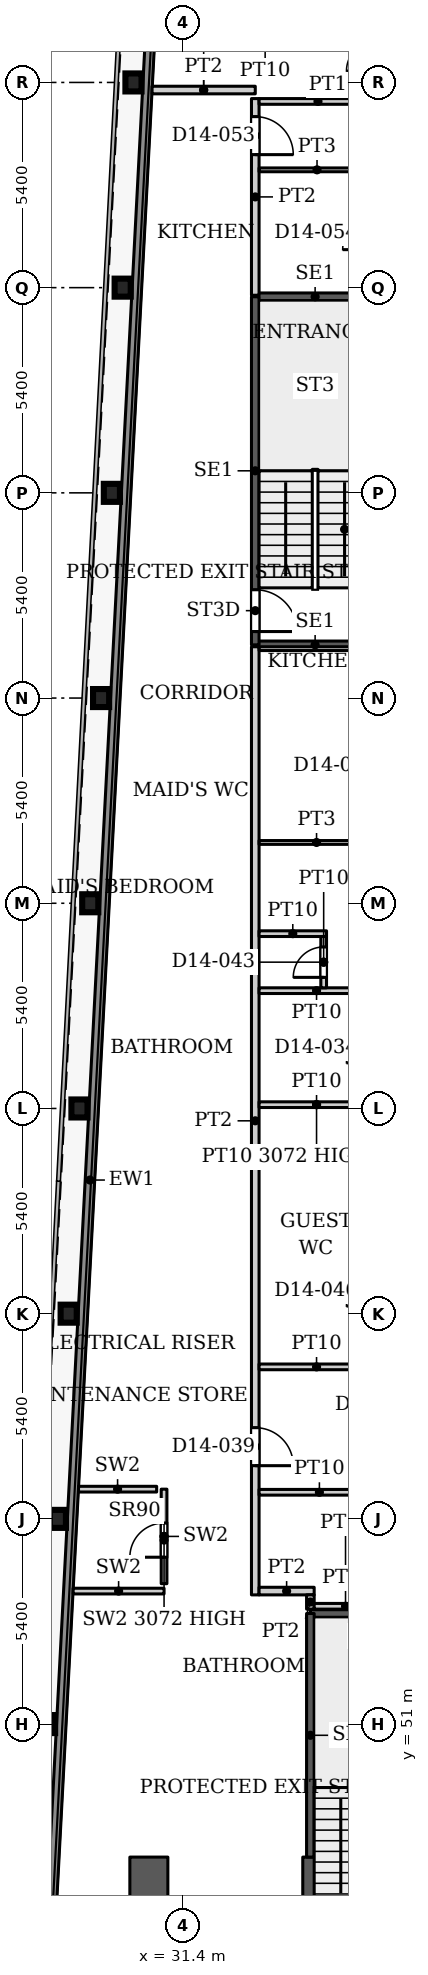
"""IFC4 building model, lengths in metres.
Left out: names, types, materials, properties, quantities, classifications, styles, units other than length and angle.
Written with IfcOpenShell. Run it as: python <this file> out.ifc"""

import sys

from ifc_helpers import new_model, si_unit, direction, frame, frame_2d, origin, origin_2d, place, context, subcontext, project, spatial, rectangle, i_section, extrude, source, transform, mapped, element, fill, save


model = new_model("IFC4")
c1 = context("Model", 3, precision=1e-05, world=origin(), true_north=direction((0.0, 1.0)))
c2 = subcontext(c1, "Body", "Model", "MODEL_VIEW")
j1 = project(units=[si_unit("LENGTHUNIT", "METRE"), si_unit("PLANEANGLEUNIT", "RADIAN")], contexts=[c1])
p1 = place(None, origin())
s1 = spatial("IfcSite", under=j1, at=p1, CompositionType="ELEMENT")
p2 = place(p1, origin())
s2 = spatial("IfcBuilding", under=s1, at=p2, CompositionType="ELEMENT")
p3 = place(p2, frame((0.0, 0.0, 69.5)))
s3 = spatial("IfcBuildingStorey", under=s2, at=p3, CompositionType="ELEMENT", Elevation=69.5)
for number, where, z_axis, x_axis in (
    (1, (27.822, 51.0, 0.0), (0.0, 0.0, 1.0), (1.0, 0.0, 0.0)),
    (2, (28.106, 56.4, 0.0), (0.0, 0.0, 1.0), (1.0, 0.0, 0.0)),
    (3, (28.39, 61.8, 0.0), (0.0, 0.0, 1.0), (1.0, 0.0, 0.0)),
    (4, (28.674, 67.2, 0.0), (0.0, 0.0, 1.0), (1.0, 0.0, 0.0)),
    (5, (28.958, 72.6, 0.0), (0.0, 0.0, 1.0), (1.0, 0.0, 0.0)),
    (6, (29.243, 78.0, 0.0), (0.0, 0.0, 1.0), (1.0, 0.0, 0.0)),
    (7, (29.527, 83.4, 0.0), (0.0, 0.0, 1.0), (1.0, 0.0, 0.0)),
    (8, (29.811, 88.8, 0.0), (0.0, 0.0, 1.0), (1.0, 0.0, 0.0)),
    (9, (30.095, 94.2, 0.0), (0.0, 0.0, 1.0), (1.0, 0.0, 0.0)),
):
    element("IfcColumn", number, at=place(p3, frame(where, z_axis=z_axis, x_axis=x_axis)), inside=s3, PredefinedType="COLUMN", context=c2, shape_type="SweptSolid", body=[
        extrude(i_section(OverallWidth=0.424, OverallDepth=0.474, WebThickness=0.048, FlangeThickness=0.077, FilletRadius=0.014, at=origin_2d()), origin(), (0.0, 0.0, 1.0), 3.9),
    ])
p4 = place(p3, frame((34.75, 29.05, 0.0), z_axis=(0.0, 0.0, 1.0), x_axis=(0.0, 1.0, 0.0)))
e10 = element("IfcWall", 10, at=p4, inside=s3, PredefinedType="SHEAR", context=c2, shape_type="SweptSolid", body=[
    extrude(rectangle(XDim=18.45, YDim=0.4, at=frame_2d((9.225, 0.0))), origin(), (0.0, 0.0, 1.0), 3.9),
])
p5 = place(p4, frame((8.025, 0.0, 0.0)))
e11 = element("IfcOpeningElement", 11, at=p5, cuts=e10, PredefinedType="OPENING", context=c2, shape_type="SweptSolid", body=[
    extrude(rectangle(XDim=1.1, YDim=2.2, at=frame_2d((0.55, 1.1))), frame((0.0, 0.21, 0.0), z_axis=(0.0, -1.0, 0.0), x_axis=(1.0, 0.0, 0.0)), (0.0, 0.0, 1.0), 0.42),
])
p6 = place(p4, frame((10.875, 0.0, 0.0)))
e12 = element("IfcOpeningElement", 12, at=p6, cuts=e10, PredefinedType="OPENING", context=c2, shape_type="SweptSolid", body=[
    extrude(rectangle(XDim=1.1, YDim=2.2, at=frame_2d((0.55, 1.1))), frame((0.0, 0.21, 0.0), z_axis=(0.0, -1.0, 0.0), x_axis=(1.0, 0.0, 0.0)), (0.0, 0.0, 1.0), 0.42),
])
p7 = place(p4, frame((13.725, 0.0, 0.0)))
e13 = element("IfcOpeningElement", 13, at=p7, cuts=e10, PredefinedType="OPENING", context=c2, shape_type="SweptSolid", body=[
    extrude(rectangle(XDim=1.1, YDim=2.2, at=frame_2d((0.55, 1.1))), frame((0.0, 0.21, 0.0), z_axis=(0.0, -1.0, 0.0), x_axis=(1.0, 0.0, 0.0)), (0.0, 0.0, 1.0), 0.42),
])
p8 = place(p4, frame((15.95, 0.0, 0.0)))
e14 = element("IfcOpeningElement", 14, at=p8, cuts=e10, PredefinedType="OPENING", context=c2, shape_type="SweptSolid", body=[
    extrude(rectangle(XDim=1.1, YDim=2.2, at=frame_2d((0.55, 1.1))), frame((0.0, 0.21, 0.0), z_axis=(0.0, -1.0, 0.0), x_axis=(1.0, 0.0, 0.0)), (0.0, 0.0, 1.0), 0.42),
])
p9 = place(p3, frame((30.5, 29.05, 0.0), z_axis=(0.0, 0.0, 1.0), x_axis=(0.0, 1.0, 0.0)))
e15 = element("IfcWall", 15, at=p9, inside=s3, PredefinedType="SHEAR", context=c2, shape_type="SweptSolid", body=[
    extrude(rectangle(XDim=18.45, YDim=1.0, at=frame_2d((9.225, 0.0))), origin(), (0.0, 0.0, 1.0), 3.9),
])
p10 = place(p9, frame((1.147, 0.0, 0.0)))
e16 = element("IfcOpeningElement", 16, at=p10, cuts=e15, PredefinedType="OPENING", context=c2, shape_type="SweptSolid", body=[
    extrude(rectangle(XDim=0.9, YDim=2.2, at=frame_2d((0.45, 1.1))), frame((0.0, 0.51, 0.0), z_axis=(0.0, -1.0, 0.0), x_axis=(1.0, 0.0, 0.0)), (0.0, 0.0, 1.0), 1.02),
])
p11 = place(p9, frame((7.925, 0.0, 0.0)))
e17 = element("IfcOpeningElement", 17, at=p11, cuts=e15, PredefinedType="OPENING", context=c2, shape_type="SweptSolid", body=[
    extrude(rectangle(XDim=0.9, YDim=2.2, at=frame_2d((0.45, 1.1))), frame((0.0, 0.51, 0.0), z_axis=(0.0, -1.0, 0.0), x_axis=(1.0, 0.0, 0.0)), (0.0, 0.0, 1.0), 1.02),
])
p12 = place(p3, frame((27.195, 31.969, 0.0), z_axis=(0.0, 0.0, 1.0), x_axis=(0.052554995867, 0.998618031286, 0.0)))
e18 = element("IfcWall", 18, at=p12, inside=s3, PredefinedType="SOLIDWALL", context=c2, shape_type="SweptSolid", body=[
    extrude(rectangle(XDim=66.787, YDim=0.25, at=frame_2d((33.394, 0.0))), origin(), (0.0, 0.0, 1.0), 3.75),
])
p13 = place(p3, frame((34.75, 53.91, 0.0), z_axis=(0.0, 0.0, 1.0), x_axis=(1.0, 0.0, 0.0)))
e19 = element("IfcWall", 19, at=p13, inside=s3, PredefinedType="SHEAR", context=c2, shape_type="SweptSolid", body=[
    extrude(rectangle(XDim=3.15, YDim=0.2, at=frame_2d((1.575, 0.0))), origin(), (0.0, 0.0, 1.0), 3.9),
])
p14 = place(p3, frame((34.75, 47.5, 0.0), z_axis=(0.0, 0.0, 1.0), x_axis=(0.0, 1.0, 0.0)))
e20 = element("IfcWall", 20, at=p14, inside=s3, PredefinedType="SHEAR", context=c2, shape_type="SweptSolid", body=[
    extrude(rectangle(XDim=6.41, YDim=0.2, at=frame_2d((3.205, 0.0))), origin(), (0.0, 0.0, 1.0), 3.9),
])
for number, where, z_axis, x_axis in (
    (21, (33.3, 79.4, 0.0), (0.0, 0.0, 1.0), (1.0, 0.0, 0.0)),
    (22, (33.3, 88.56, 0.0), (0.0, 0.0, 1.0), (1.0, 0.0, 0.0)),
):
    element("IfcWall", number, at=place(p3, frame(where, z_axis=z_axis, x_axis=x_axis)), inside=s3, PredefinedType="SHEAR", context=c2, shape_type="SweptSolid", body=[
        extrude(rectangle(XDim=3.15, YDim=0.2, at=frame_2d((1.575, 0.0))), origin(), (0.0, 0.0, 1.0), 3.9),
    ])
p15 = place(p3, frame((33.3, 79.4, 0.0), z_axis=(0.0, 0.0, 1.0), x_axis=(0.0, 1.0, 0.0)))
e23 = element("IfcWall", 23, at=p15, inside=s3, PredefinedType="SHEAR", context=c2, shape_type="SweptSolid", body=[
    extrude(rectangle(XDim=9.16, YDim=0.2, at=frame_2d((4.58, 0.0))), origin(), (0.0, 0.0, 1.0), 3.9),
])
p16 = place(p15, frame((0.35, 0.0, 0.0)))
e24 = element("IfcOpeningElement", 24, at=p16, cuts=e23, PredefinedType="OPENING", context=c2, shape_type="SweptSolid", body=[
    extrude(rectangle(XDim=1.1, YDim=2.2, at=frame_2d((0.55, 1.1))), frame((0.0, 0.11, 0.0), z_axis=(0.0, -1.0, 0.0), x_axis=(1.0, 0.0, 0.0)), (0.0, 0.0, 1.0), 0.22),
])
p17 = place(p3, frame((28.508, 54.5, 0.0), z_axis=(0.0, 0.0, 1.0), x_axis=(1.0, 0.0, 0.0)))
e25 = element("IfcWall", 25, at=p17, inside=s3, PredefinedType="PARTITIONING", context=c2, shape_type="SweptSolid", body=[
    extrude(rectangle(XDim=2.392, YDim=0.15, at=frame_2d((1.196, 0.0))), origin(), (0.0, 0.0, 1.0), 3.9),
])
p18 = place(p3, frame((30.9, 54.695, 0.0), z_axis=(0.0, 0.0, 1.0), x_axis=(0.0, 1.0, 0.0)))
e26 = element("IfcWall", 26, at=p18, inside=s3, PredefinedType="PARTITIONING", context=c2, shape_type="SweptSolid", body=[
    extrude(rectangle(XDim=2.487, YDim=0.15, at=frame_2d((1.243, 0.0))), origin(), (0.0, 0.0, 1.0), 3.072),
])
p19 = place(p18, frame((0.696, 0.0, 0.0)))
e27 = element("IfcOpeningElement", 27, at=p19, cuts=e26, PredefinedType="OPENING", context=c2, shape_type="SweptSolid", body=[
    extrude(rectangle(XDim=0.9, YDim=2.2, at=frame_2d((0.45, 1.1))), frame((0.0, 0.085, 0.0), z_axis=(0.0, -1.0, 0.0), x_axis=(1.0, 0.0, 0.0)), (0.0, 0.0, 1.0), 0.17),
])
p20 = place(p3, frame((28.649, 57.182, 0.0), z_axis=(0.0, 0.0, 1.0), x_axis=(1.0, 0.0, 0.0)))
e28 = element("IfcWall", 28, at=p20, inside=s3, PredefinedType="PARTITIONING", context=c2, shape_type="SweptSolid", body=[
    extrude(rectangle(XDim=2.056, YDim=0.15, at=frame_2d((1.028, 0.0))), origin(), (0.0, 0.0, 1.0), 3.9),
])
p21 = place(p3, frame((30.585, 94.0, 0.0), z_axis=(0.0, 0.0, 1.0), x_axis=(1.0, 0.0, 0.0)))
e29 = element("IfcWall", 29, at=p21, inside=s3, PredefinedType="PARTITIONING", context=c2, shape_type="SweptSolid", body=[
    extrude(rectangle(XDim=2.715, YDim=0.2, at=frame_2d((1.358, 0.0))), origin(), (0.0, 0.0, 1.0), 3.147),
])
p22 = place(p3, frame((33.3, 54.4, 0.0), z_axis=(0.0, 0.0, 1.0), x_axis=(0.0, 1.0, 0.0)))
e30 = element("IfcWall", 30, at=p22, inside=s3, PredefinedType="PARTITIONING", context=c2, shape_type="SweptSolid", body=[
    extrude(rectangle(XDim=24.95, YDim=0.2, at=frame_2d((12.475, 0.0))), origin(), (0.0, 0.0, 1.0), 3.6),
])
p23 = place(p22, frame((3.4, 0.0, 0.0)))
e31 = element("IfcOpeningElement", 31, at=p23, cuts=e30, PredefinedType="OPENING", context=c2, shape_type="SweptSolid", body=[
    extrude(rectangle(XDim=1.0, YDim=2.1, at=frame_2d((0.5, 1.05))), frame((0.0, 0.11, 0.0), z_axis=(0.0, -1.0, 0.0), x_axis=(1.0, 0.0, 0.0)), (0.0, 0.0, 1.0), 0.22),
])
p24 = place(p3, frame((33.3, 88.6, 0.0), z_axis=(0.0, 0.0, 1.0), x_axis=(0.0, 1.0, 0.0)))
e32 = element("IfcWall", 32, at=p24, inside=s3, PredefinedType="PARTITIONING", context=c2, shape_type="SweptSolid", body=[
    extrude(rectangle(XDim=5.175, YDim=0.2, at=frame_2d((2.587, 0.0))), origin(), (0.0, 0.0, 1.0), 3.6),
])
p25 = place(p24, frame((3.7, 0.0, 0.0)))
e33 = element("IfcOpeningElement", 33, at=p25, cuts=e32, PredefinedType="OPENING", context=c2, shape_type="SweptSolid", body=[
    extrude(rectangle(XDim=1.0, YDim=2.1, at=frame_2d((0.5, 1.05))), frame((0.0, 0.11, 0.0), z_axis=(0.0, -1.0, 0.0), x_axis=(1.0, 0.0, 0.0)), (0.0, 0.0, 1.0), 0.22),
])
p26 = place(p3, frame((33.4, 54.5, 0.0), z_axis=(0.0, 0.0, 1.0), x_axis=(1.0, 0.0, 0.0)))
e34 = element("IfcWall", 34, at=p26, inside=s3, PredefinedType="PARTITIONING", context=c2, shape_type="SweptSolid", body=[
    extrude(rectangle(XDim=1.45, YDim=0.2, at=frame_2d((0.725, 0.0))), origin(), (0.0, 0.0, 1.0), 3.6),
])
p27 = place(p3, frame((33.4, 57.1, 0.0), z_axis=(0.0, 0.0, 1.0), x_axis=(1.0, 0.0, 0.0)))
e35 = element("IfcWall", 35, at=p27, inside=s3, PredefinedType="PARTITIONING", context=c2, shape_type="SweptSolid", body=[
    extrude(rectangle(XDim=3.175, YDim=0.15, at=frame_2d((1.587, 0.0))), origin(), (0.0, 0.0, 1.0), 3.6),
])
p28 = place(p3, frame((33.4, 60.4, 0.0), z_axis=(0.0, 0.0, 1.0), x_axis=(1.0, 0.0, 0.0)))
e36 = element("IfcWall", 36, at=p28, inside=s3, PredefinedType="PARTITIONING", context=c2, shape_type="SweptSolid", body=[
    extrude(rectangle(XDim=3.025, YDim=0.15, at=frame_2d((1.513, 0.0))), origin(), (0.0, 0.0, 1.0), 3.6),
])
p29 = place(p3, frame((33.4, 67.3, 0.0), z_axis=(0.0, 0.0, 1.0), x_axis=(1.0, 0.0, 0.0)))
e37 = element("IfcWall", 37, at=p29, inside=s3, PredefinedType="PARTITIONING", context=c2, shape_type="SweptSolid", body=[
    extrude(rectangle(XDim=3.025, YDim=0.15, at=frame_2d((1.513, 0.0))), origin(), (0.0, 0.0, 1.0), 3.072),
])
p30 = place(p3, frame((33.4, 70.3, 0.0), z_axis=(0.0, 0.0, 1.0), x_axis=(1.0, 0.0, 0.0)))
e38 = element("IfcWall", 38, at=p30, inside=s3, PredefinedType="PARTITIONING", context=c2, shape_type="SweptSolid", body=[
    extrude(rectangle(XDim=3.025, YDim=0.15, at=frame_2d((1.513, 0.0))), origin(), (0.0, 0.0, 1.0), 3.6),
])
p31 = place(p3, frame((33.4, 71.8, 0.0), z_axis=(0.0, 0.0, 1.0), x_axis=(1.0, 0.0, 0.0)))
e39 = element("IfcWall", 39, at=p31, inside=s3, PredefinedType="PARTITIONING", context=c2, shape_type="SweptSolid", body=[
    extrude(rectangle(XDim=1.775, YDim=0.15, at=frame_2d((0.888, 0.0))), origin(), (0.0, 0.0, 1.0), 3.6),
])
p32 = place(p3, frame((33.4, 74.2, 0.0), z_axis=(0.0, 0.0, 1.0), x_axis=(1.0, 0.0, 0.0)))
e40 = element("IfcWall", 40, at=p32, inside=s3, PredefinedType="PARTITIONING", context=c2, shape_type="SweptSolid", body=[
    extrude(rectangle(XDim=3.025, YDim=0.1, at=frame_2d((1.513, 0.0))), origin(), (0.0, 0.0, 1.0), 3.6),
])
p33 = place(p3, frame((33.4, 79.3, 0.0), z_axis=(0.0, 0.0, 1.0), x_axis=(1.0, 0.0, 0.0)))
e41 = element("IfcWall", 41, at=p33, inside=s3, PredefinedType="PARTITIONING", context=c2, shape_type="SweptSolid", body=[
    extrude(rectangle(XDim=12.5, YDim=0.1, at=frame_2d((6.25, 0.0))), origin(), (0.0, 0.0, 1.0), 3.6),
])
p34 = place(p33, frame((3.355, 0.0, 0.0)))
e42 = element("IfcOpeningElement", 42, at=p34, cuts=e41, PredefinedType="OPENING", context=c2, shape_type="SweptSolid", body=[
    extrude(rectangle(XDim=0.9, YDim=2.1, at=frame_2d((0.45, 1.05))), frame((0.0, 0.06, 0.0), z_axis=(0.0, -1.0, 0.0), x_axis=(1.0, 0.0, 0.0)), (0.0, 0.0, 1.0), 0.12),
])
p35 = place(p3, frame((33.4, 91.9, 0.0), z_axis=(0.0, 0.0, 1.0), x_axis=(1.0, 0.0, 0.0)))
e43 = element("IfcWall", 43, at=p35, inside=s3, PredefinedType="PARTITIONING", context=c2, shape_type="SweptSolid", body=[
    extrude(rectangle(XDim=3.05, YDim=0.1, at=frame_2d((1.525, 0.0))), origin(), (0.0, 0.0, 1.0), 3.6),
])
p36 = place(p3, frame((33.4, 93.7, 0.0), z_axis=(0.0, 0.0, 1.0), x_axis=(1.0, 0.0, 0.0)))
e44 = element("IfcWall", 44, at=p36, inside=s3, PredefinedType="PARTITIONING", context=c2, shape_type="SweptSolid", body=[
    extrude(rectangle(XDim=3.1, YDim=0.15, at=frame_2d((1.55, 0.0))), origin(), (0.0, 0.0, 1.0), 3.6),
])
p37 = place(p3, frame((34.75, 54.025, 0.0), z_axis=(0.0, 0.0, 1.0), x_axis=(0.0, 1.0, 0.0)))
e45 = element("IfcWall", 45, at=p37, inside=s3, PredefinedType="PARTITIONING", context=c2, shape_type="SweptSolid", body=[
    extrude(rectangle(XDim=0.375, YDim=0.2, at=frame_2d((0.188, 0.0))), origin(), (0.0, 0.0, 1.0), 3.6),
])
p38 = place(p3, frame((34.85, 54.1, 0.0), z_axis=(0.0, 0.0, 1.0), x_axis=(1.0, 0.0, 0.0)))
e46 = element("IfcWall", 46, at=p38, inside=s3, PredefinedType="PARTITIONING", context=c2, shape_type="SweptSolid", body=[
    extrude(rectangle(XDim=1.65, YDim=0.15, at=frame_2d((0.825, 0.0))), origin(), (0.0, 0.0, 1.0), 3.6),
])
p39 = place(p3, frame((35.1, 70.375, 0.0), z_axis=(0.0, 0.0, 1.0), x_axis=(0.0, 1.0, 0.0)))
e47 = element("IfcWall", 47, at=p39, inside=s3, PredefinedType="PARTITIONING", context=c2, shape_type="SweptSolid", body=[
    extrude(rectangle(XDim=1.35, YDim=0.15, at=frame_2d((0.675, 0.0))), origin(), (0.0, 0.0, 1.0), 3.6),
])
p40 = place(p39, frame((0.275, 0.0, 0.0)))
e48 = element("IfcOpeningElement", 48, at=p40, cuts=e47, PredefinedType="OPENING", context=c2, shape_type="SweptSolid", body=[
    extrude(rectangle(XDim=0.8, YDim=2.1, at=frame_2d((0.4, 1.05))), frame((0.0, 0.085, 0.0), z_axis=(0.0, -1.0, 0.0), x_axis=(1.0, 0.0, 0.0)), (0.0, 0.0, 1.0), 0.17),
])
m1 = source(origin(), c2, "Body", "SweptSolid", [
    extrude(rectangle(XDim=0.9, YDim=2.2, at=frame_2d((0.45, 1.1))), frame((0.0, 0.025, 0.0), z_axis=(0.0, -1.0, 0.0), x_axis=(1.0, 0.0, 0.0)), (0.0, 0.0, 1.0), 0.05),
])
p41 = place(p19, origin())
e49 = element("IfcDoor", 49, at=p41, inside=s3, OperationType="SINGLE_SWING_LEFT", PredefinedType="DOOR", context=c2, shape_type="MappedRepresentation", body=[
    mapped(m1, transform((0.0, 0.0, 0.0), x_axis=(1.0, 0.0, 0.0), y_axis=(0.0, 1.0, 0.0), z_axis=(0.0, 0.0, 1.0), scale=1.0)),
])
fill(e27, e49)
m2 = source(origin(), c2, "Body", "SweptSolid", [
    extrude(rectangle(XDim=1.1, YDim=2.2, at=frame_2d((0.55, 1.1))), frame((0.0, 0.025, 0.0), z_axis=(0.0, -1.0, 0.0), x_axis=(1.0, 0.0, 0.0)), (0.0, 0.0, 1.0), 0.05),
])
p42 = place(p16, origin())
e50 = element("IfcDoor", 50, at=p42, inside=s3, OperationType="SINGLE_SWING_RIGHT", PredefinedType="DOOR", context=c2, shape_type="MappedRepresentation", body=[
    mapped(m2, transform((0.0, 0.0, 0.0), x_axis=(1.0, 0.0, 0.0), y_axis=(0.0, 1.0, 0.0), z_axis=(0.0, 0.0, 1.0), scale=1.0)),
])
fill(e24, e50)
m3 = source(origin(), c2, "Body", "SweptSolid", [
    extrude(rectangle(XDim=1.0, YDim=2.1, at=frame_2d((0.5, 1.05))), frame((0.0, 0.025, 0.0), z_axis=(0.0, -1.0, 0.0), x_axis=(1.0, 0.0, 0.0)), (0.0, 0.0, 1.0), 0.05),
])
p43 = place(p23, origin())
e51 = element("IfcDoor", 51, at=p43, inside=s3, OperationType="SINGLE_SWING_RIGHT", PredefinedType="DOOR", context=c2, shape_type="MappedRepresentation", body=[
    mapped(m3, transform((0.0, 0.0, 0.0), x_axis=(1.0, 0.0, 0.0), y_axis=(0.0, 1.0, 0.0), z_axis=(0.0, 0.0, 1.0), scale=1.0)),
])
fill(e31, e51)
m4 = source(origin(), c2, "Body", "SweptSolid", [
    extrude(rectangle(XDim=0.8, YDim=2.1, at=frame_2d((0.4, 1.05))), frame((0.0, 0.025, 0.0), z_axis=(0.0, -1.0, 0.0), x_axis=(1.0, 0.0, 0.0)), (0.0, 0.0, 1.0), 0.05),
])
p44 = place(p40, origin())
e52 = element("IfcDoor", 52, at=p44, inside=s3, OperationType="SINGLE_SWING_LEFT", PredefinedType="DOOR", context=c2, shape_type="MappedRepresentation", body=[
    mapped(m4, transform((0.0, 0.0, 0.0), x_axis=(1.0, 0.0, 0.0), y_axis=(0.0, 1.0, 0.0), z_axis=(0.0, 0.0, 1.0), scale=1.0)),
])
fill(e48, e52)
p45 = place(p25, origin())
e53 = element("IfcDoor", 53, at=p45, inside=s3, OperationType="SINGLE_SWING_RIGHT", PredefinedType="DOOR", context=c2, shape_type="MappedRepresentation", body=[
    mapped(m3, transform((0.0, 0.0, 0.0), x_axis=(1.0, 0.0, 0.0), y_axis=(0.0, 1.0, 0.0), z_axis=(0.0, 0.0, 1.0), scale=1.0)),
])
fill(e33, e53)
save(model, sys.argv[1])
